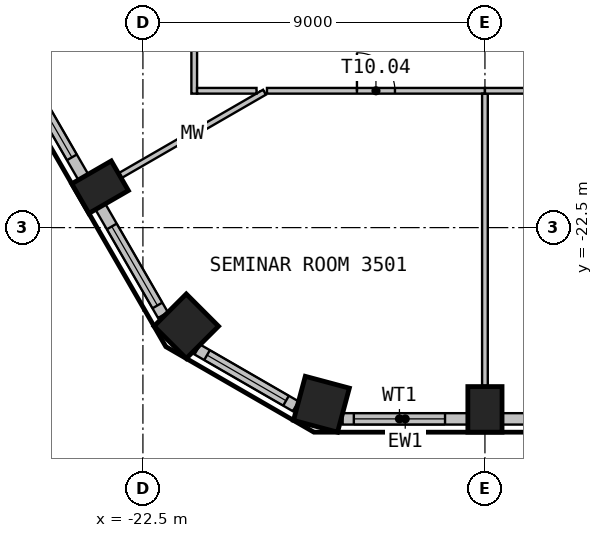
"""IFC4 building model, lengths in metres.
Left out: names, types, materials, properties, quantities, classifications, styles, units other than length and angle.
Written with IfcOpenShell. Run it as: python <this file> out.ifc"""

import sys

from ifc_helpers import new_model, si_unit, direction, frame, frame_2d, origin, origin_2d, place, context, subcontext, project, spatial, rectangle, extrude, element, fill, save


model = new_model("IFC4")
c1 = context("Model", 3, precision=1e-05, world=origin(), true_north=direction((0.0, 1.0)))
c2 = subcontext(c1, "Body", "Model", "MODEL_VIEW")
j1 = project(units=[si_unit("LENGTHUNIT", "METRE"), si_unit("PLANEANGLEUNIT", "RADIAN")], contexts=[c1])
p1 = place(None, origin())
s1 = spatial("IfcSite", under=j1, at=p1, CompositionType="ELEMENT")
p2 = place(p1, origin())
s2 = spatial("IfcBuilding", under=s1, at=p2, CompositionType="ELEMENT")
p3 = place(p2, frame((0.0, 0.0, 144.3)))
s3 = spatial("IfcBuildingStorey", under=s2, at=p3, CompositionType="ELEMENT", Elevation=144.3)
p4 = place(p3, frame((-17.803, -27.148, 0.0), z_axis=(0.0, 0.0, 1.0), x_axis=(0.965925826289, -0.258819045103, 0.0)))
e1 = element("IfcColumn", 1, at=p4, inside=s3, PredefinedType="COLUMN", context=c2, shape_type="SweptSolid", body=[
    extrude(rectangle(XDim=1.2, YDim=1.2, at=origin_2d()), origin(), (0.0, 0.0, 1.0), 3.575),
])
for number, where, z_axis, x_axis in (
    (2, (-13.5, -27.283, 0.0), (0.0, 0.0, 1.0), (1.0, 0.0, 0.0)),
    (3, (-23.627, -21.436, 0.0), (0.0, 0.0, 1.0), (0.5, -0.866, 0.0)),
):
    element("IfcColumn", number, at=place(p3, frame(where, z_axis=z_axis, x_axis=x_axis)), inside=s3, PredefinedType="COLUMN", context=c2, shape_type="SweptSolid", body=[
        extrude(rectangle(XDim=0.9, YDim=1.2, at=origin_2d()), origin(), (0.0, 0.0, 1.0), 3.575),
    ])
p5 = place(p3, frame((-21.359, -25.095, 0.0), z_axis=(0.0, 0.0, 1.0), x_axis=(0.707106781187, -0.707106781187, 0.0)))
e4 = element("IfcColumn", 4, at=p5, inside=s3, PredefinedType="COLUMN", context=c2, shape_type="SweptSolid", body=[
    extrude(rectangle(XDim=1.2, YDim=1.2, at=origin_2d()), origin(), (0.0, 0.0, 1.0), 3.575),
])
p6 = place(p3, frame((-17.245, -27.533, 0.0), z_axis=(0.0, 0.0, 1.0), x_axis=(1.0, 0.0, 0.0)))
e5 = element("IfcWall", 5, at=p6, inside=s3, PredefinedType="SOLIDWALL", context=c2, shape_type="SweptSolid", body=[
    extrude(rectangle(XDim=3.294, YDim=0.3, at=frame_2d((1.647, 0.0))), origin(), (0.0, 0.0, 1.0), 3.575),
])
p7 = place(p6, frame((0.295, 0.0, 0.9)))
e6 = element("IfcOpeningElement", 6, at=p7, cuts=e5, PredefinedType="OPENING", context=c2, shape_type="SweptSolid", body=[
    extrude(rectangle(XDim=2.4, YDim=2.1, at=frame_2d((1.2, 1.05))), frame((0.0, 0.16, 0.0), z_axis=(0.0, -1.0, 0.0), x_axis=(1.0, 0.0, 0.0)), (0.0, 0.0, 1.0), 0.32),
])
p8 = place(p3, frame((-13.05, -27.533, 0.0), z_axis=(0.0, 0.0, 1.0), x_axis=(1.0, 0.0, 0.0)))
e7 = element("IfcWall", 7, at=p8, inside=s3, PredefinedType="SOLIDWALL", context=c2, shape_type="SweptSolid", body=[
    extrude(rectangle(XDim=3.599, YDim=0.3, at=frame_2d((1.8, 0.0))), origin(), (0.0, 0.0, 1.0), 3.575),
])
p9 = place(p8, frame((0.6, 0.0, 0.9)))
e8 = element("IfcOpeningElement", 8, at=p9, cuts=e7, PredefinedType="OPENING", context=c2, shape_type="SweptSolid", body=[
    extrude(rectangle(XDim=2.4, YDim=2.1, at=frame_2d((1.2, 1.05))), frame((0.0, 0.16, 0.0), z_axis=(0.0, -1.0, 0.0), x_axis=(1.0, 0.0, 0.0)), (0.0, 0.0, 1.0), 0.32),
])
p10 = place(p3, frame((-25.869, -18.054, 0.0), z_axis=(0.0, 0.0, 1.0), x_axis=(0.500027802648, -0.866009351323, 0.0)))
e9 = element("IfcWall", 9, at=p10, inside=s3, PredefinedType="SOLIDWALL", context=c2, shape_type="SweptSolid", body=[
    extrude(rectangle(XDim=3.599, YDim=0.3, at=frame_2d((1.799, 0.0))), origin(), (0.0, 0.0, 1.0), 3.575),
])
p11 = place(p10, frame((0.6, 0.0, 0.9)))
e10 = element("IfcOpeningElement", 10, at=p11, cuts=e9, PredefinedType="OPENING", context=c2, shape_type="SweptSolid", body=[
    extrude(rectangle(XDim=2.4, YDim=2.1, at=frame_2d((1.2, 1.05))), frame((0.0, 0.16, 0.0), z_axis=(0.0, -1.0, 0.0), x_axis=(1.0, 0.0, 0.0)), (0.0, 0.0, 1.0), 0.32),
])
p12 = place(p3, frame((-23.619, -21.951, 0.0), z_axis=(0.0, 0.0, 1.0), x_axis=(0.500036802197, -0.866004154983, 0.0)))
e11 = element("IfcWall", 11, at=p12, inside=s3, PredefinedType="SOLIDWALL", context=c2, shape_type="SweptSolid", body=[
    extrude(rectangle(XDim=3.294, YDim=0.3, at=frame_2d((1.647, 0.0))), origin(), (0.0, 0.0, 1.0), 3.575),
])
p13 = place(p12, frame((0.6, 0.0, 0.9)))
e12 = element("IfcOpeningElement", 12, at=p13, cuts=e11, PredefinedType="OPENING", context=c2, shape_type="SweptSolid", body=[
    extrude(rectangle(XDim=2.4, YDim=2.1, at=frame_2d((1.2, 1.05))), frame((0.0, 0.16, 0.0), z_axis=(0.0, -1.0, 0.0), x_axis=(1.0, 0.0, 0.0)), (0.0, 0.0, 1.0), 0.32),
])
p14 = place(p3, frame((-21.068, -25.707, 0.0), z_axis=(0.0, 0.0, 1.0), x_axis=(0.866012844897, -0.500021752, 0.0)))
e13 = element("IfcWall", 13, at=p14, inside=s3, PredefinedType="SOLIDWALL", context=c2, shape_type="SweptSolid", body=[
    extrude(rectangle(XDim=2.989, YDim=0.3, at=frame_2d((1.495, 0.0))), origin(), (0.0, 0.0, 1.0), 3.575),
])
p15 = place(p14, frame((0.295, 0.0, 0.9)))
e14 = element("IfcOpeningElement", 14, at=p15, cuts=e13, PredefinedType="OPENING", context=c2, shape_type="SweptSolid", body=[
    extrude(rectangle(XDim=2.4, YDim=2.1, at=frame_2d((1.2, 1.05))), frame((0.0, 0.16, 0.0), z_axis=(0.0, -1.0, 0.0), x_axis=(1.0, 0.0, 0.0)), (0.0, 0.0, 1.0), 0.32),
])
p16 = place(p3, frame((-19.301, -18.938, 0.0), z_axis=(0.0, 0.0, 1.0), x_axis=(-0.865968165673, -0.500099126214, 0.0)))
e15 = element("IfcWall", 15, at=p16, inside=s3, PredefinedType="MOVABLE", context=c2, shape_type="SweptSolid", body=[
    extrude(rectangle(XDim=4.376, YDim=0.15, at=frame_2d((2.188, 0.0))), origin(), (0.0, 0.0, 1.0), 3.575),
])
p17 = place(p3, frame((-21.15, -2.325, 0.0), z_axis=(0.0, 0.0, 1.0), x_axis=(0.0, -1.0, 0.0)))
e16 = element("IfcWall", 16, at=p17, inside=s3, PredefinedType="PARTITIONING", context=c2, shape_type="SweptSolid", body=[
    extrude(rectangle(XDim=16.65, YDim=0.15, at=frame_2d((8.325, 0.0))), origin(), (0.0, 0.0, 1.0), 3.575),
])
p18 = place(p17, frame((7.825, 0.0, 0.0)))
e17 = element("IfcOpeningElement", 17, at=p18, cuts=e16, PredefinedType="OPENING", context=c2, shape_type="SweptSolid", body=[
    extrude(rectangle(XDim=1.0, YDim=2.1, at=frame_2d((0.5, 1.05))), frame((0.0, 0.085, 0.0), z_axis=(0.0, -1.0, 0.0), x_axis=(1.0, 0.0, 0.0)), (0.0, 0.0, 1.0), 0.17),
])
p19 = place(p3, frame((-21.075, -18.9, 0.0), z_axis=(0.0, 0.0, 1.0), x_axis=(1.0, 0.0, 0.0)))
e18 = element("IfcWall", 18, at=p19, inside=s3, PredefinedType="PARTITIONING", context=c2, shape_type="SweptSolid", body=[
    extrude(rectangle(XDim=1.564, YDim=0.15, at=frame_2d((0.782, 0.0))), origin(), (0.0, 0.0, 1.0), 3.575),
])
p20 = place(p3, frame((-19.236, -18.9, 0.0), z_axis=(0.0, 0.0, 1.0), x_axis=(1.0, 0.0, 0.0)))
e19 = element("IfcWall", 19, at=p20, inside=s3, PredefinedType="PARTITIONING", context=c2, shape_type="SweptSolid", body=[
    extrude(rectangle(XDim=5.736, YDim=0.15, at=frame_2d((2.868, 0.0))), origin(), (0.0, 0.0, 1.0), 3.575),
])
p21 = place(p20, frame((2.368, 0.0, 0.0)))
e20 = element("IfcOpeningElement", 20, at=p21, cuts=e19, PredefinedType="OPENING", context=c2, shape_type="SweptSolid", body=[
    extrude(rectangle(XDim=1.0, YDim=2.1, at=frame_2d((0.5, 1.05))), frame((0.0, 0.085, 0.0), z_axis=(0.0, -1.0, 0.0), x_axis=(1.0, 0.0, 0.0)), (0.0, 0.0, 1.0), 0.17),
])
p22 = place(p3, frame((-13.5, -18.975, 0.0), z_axis=(0.0, 0.0, 1.0), x_axis=(0.0, -1.0, 0.0)))
e21 = element("IfcWall", 21, at=p22, inside=s3, PredefinedType="PARTITIONING", context=c2, shape_type="SweptSolid", body=[
    extrude(rectangle(XDim=7.688, YDim=0.15, at=frame_2d((3.844, 0.0))), origin(), (0.0, 0.0, 1.0), 3.575),
])
p23 = place(p3, frame((-13.5, -18.9, 0.0), z_axis=(0.0, 0.0, 1.0), x_axis=(1.0, 0.0, 0.0)))
e22 = element("IfcWall", 22, at=p23, inside=s3, PredefinedType="PARTITIONING", context=c2, shape_type="SweptSolid", body=[
    extrude(rectangle(XDim=18.0, YDim=0.15, at=frame_2d((9.0, 0.0))), origin(), (0.0, 0.0, 1.0), 3.575),
])
p24 = place(p23, frame((8.5, 0.0, 0.0)))
e23 = element("IfcOpeningElement", 23, at=p24, cuts=e22, PredefinedType="OPENING", context=c2, shape_type="SweptSolid", body=[
    extrude(rectangle(XDim=1.0, YDim=2.1, at=frame_2d((0.5, 1.05))), frame((0.0, 0.085, 0.0), z_axis=(0.0, -1.0, 0.0), x_axis=(1.0, 0.0, 0.0)), (0.0, 0.0, 1.0), 0.17),
])
p25 = place(p7, origin())
e24 = element("IfcWindow", 24, at=p25, inside=s3, PartitioningType="SINGLE_PANEL", PredefinedType="WINDOW", context=c2, shape_type="SweptSolid", body=[
    extrude(rectangle(XDim=2.4, YDim=2.1, at=frame_2d((1.2, 1.05))), frame((0.0, 0.03, 0.0), z_axis=(0.0, -1.0, 0.0), x_axis=(1.0, 0.0, 0.0)), (0.0, 0.0, 1.0), 0.06),
])
fill(e6, e24)
p26 = place(p11, origin())
e25 = element("IfcWindow", 25, at=p26, inside=s3, PartitioningType="SINGLE_PANEL", PredefinedType="WINDOW", context=c2, shape_type="SweptSolid", body=[
    extrude(rectangle(XDim=2.4, YDim=2.1, at=frame_2d((1.2, 1.05))), frame((0.0, 0.03, 0.0), z_axis=(0.0, -1.0, 0.0), x_axis=(1.0, 0.0, 0.0)), (0.0, 0.0, 1.0), 0.06),
])
fill(e10, e25)
p27 = place(p13, origin())
e26 = element("IfcWindow", 26, at=p27, inside=s3, PartitioningType="SINGLE_PANEL", PredefinedType="WINDOW", context=c2, shape_type="SweptSolid", body=[
    extrude(rectangle(XDim=2.4, YDim=2.1, at=frame_2d((1.2, 1.05))), frame((0.0, 0.03, 0.0), z_axis=(0.0, -1.0, 0.0), x_axis=(1.0, 0.0, 0.0)), (0.0, 0.0, 1.0), 0.06),
])
fill(e12, e26)
p28 = place(p15, origin())
e27 = element("IfcWindow", 27, at=p28, inside=s3, PartitioningType="SINGLE_PANEL", PredefinedType="WINDOW", context=c2, shape_type="SweptSolid", body=[
    extrude(rectangle(XDim=2.4, YDim=2.1, at=frame_2d((1.2, 1.05))), frame((0.0, 0.03, 0.0), z_axis=(0.0, -1.0, 0.0), x_axis=(1.0, 0.0, 0.0)), (0.0, 0.0, 1.0), 0.06),
])
fill(e14, e27)
p29 = place(p21, origin())
e28 = element("IfcDoor", 28, at=p29, inside=s3, OperationType="SINGLE_SWING_RIGHT", PredefinedType="DOOR", context=c2, shape_type="SweptSolid", body=[
    extrude(rectangle(XDim=1.0, YDim=2.1, at=frame_2d((0.5, 1.05))), frame((0.0, 0.025, 0.0), z_axis=(0.0, -1.0, 0.0), x_axis=(1.0, 0.0, 0.0)), (0.0, 0.0, 1.0), 0.05),
])
fill(e20, e28)
save(model, sys.argv[1])
